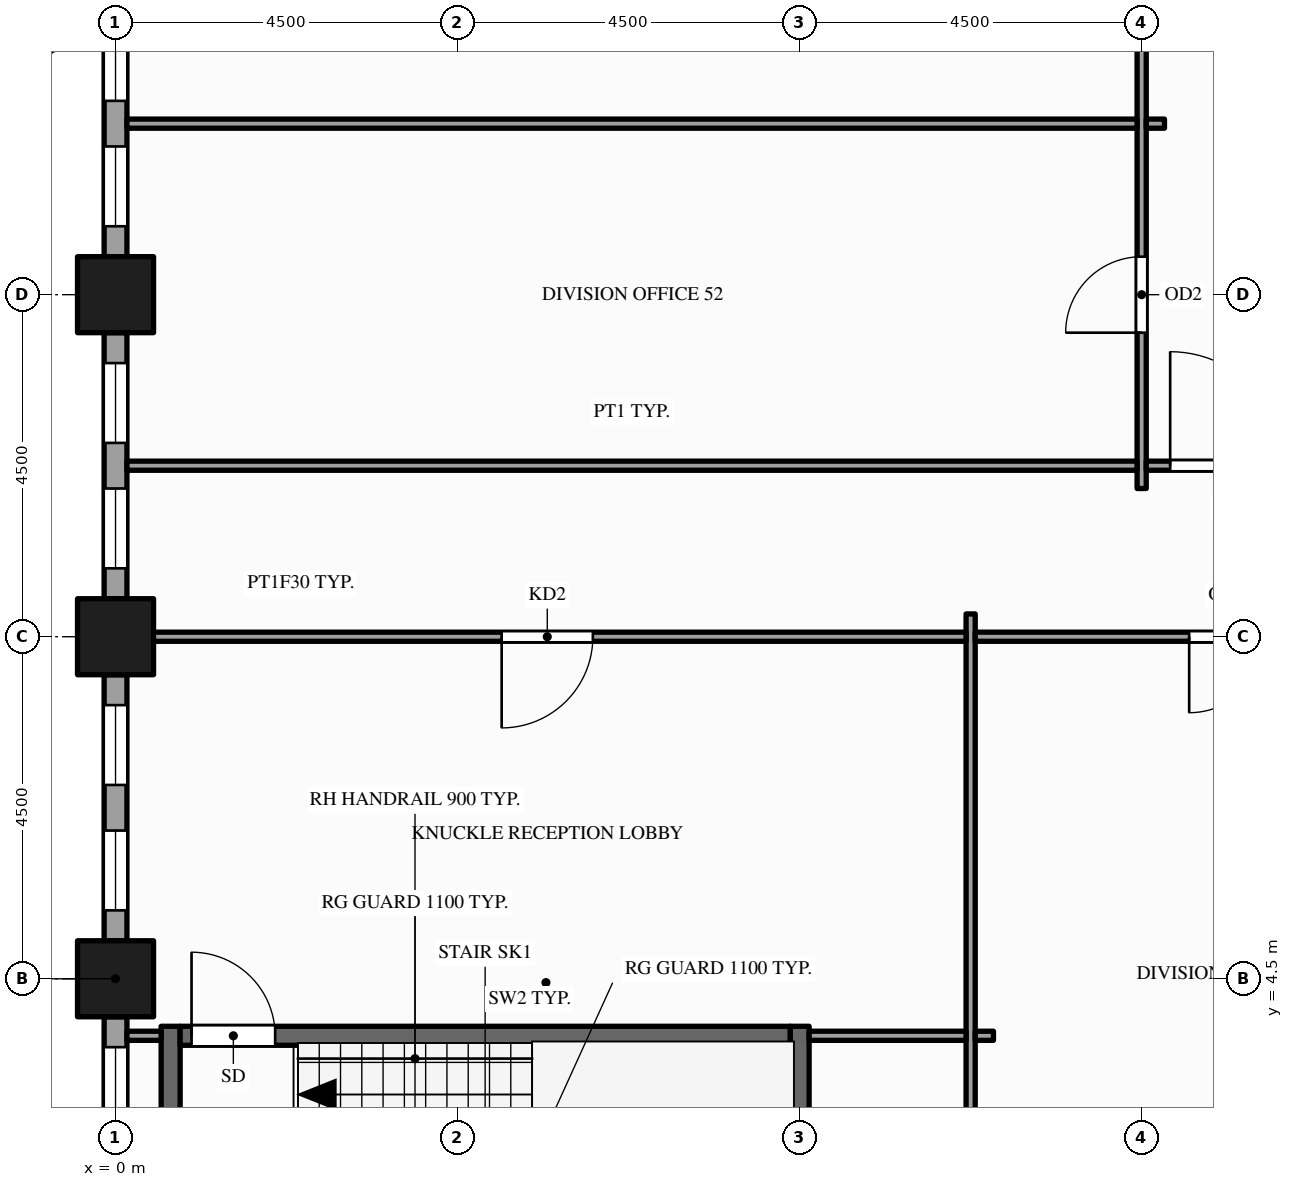
"""IFC4 building model, lengths in metres.
Left out: names, types, materials, properties, quantities, classifications, styles, units other than length and angle.
Written with IfcOpenShell. Run it as: python <this file> out.ifc"""

import sys

from ifc_helpers import new_model, si_unit, direction, frame, frame_2d, origin, origin_2d, place, context, subcontext, project, spatial, rectangle, hollow_rectangle, extrude, element, fill, save


model = new_model("IFC4")
c1 = context("Model", 3, precision=1e-05, world=origin(), true_north=direction((0.0, 1.0)))
c2 = subcontext(c1, "Body", "Model", "MODEL_VIEW")
j1 = project(units=[si_unit("LENGTHUNIT", "METRE"), si_unit("PLANEANGLEUNIT", "RADIAN")], contexts=[c1])
p1 = place(None, origin())
s1 = spatial("IfcSite", under=j1, at=p1, CompositionType="ELEMENT")
p2 = place(p1, origin())
s2 = spatial("IfcBuilding", under=s1, at=p2, CompositionType="ELEMENT")
p3 = place(p2, frame((0.0, 0.0, 95.0)))
s3 = spatial("IfcBuildingStorey", under=s2, at=p3, CompositionType="ELEMENT", Elevation=95.0)
for number, where, z_axis, x_axis in (
    (1, (0.0, 4.5, -0.15), (0.0, 0.0, 1.0), (1.0, 0.0, 0.0)),
    (2, (0.0, 9.0, -0.15), (0.0, 0.0, 1.0), (1.0, 0.0, 0.0)),
    (3, (0.0, 13.5, -0.15), (0.0, 0.0, 1.0), (1.0, 0.0, 0.0)),
):
    element("IfcColumn", number, at=place(p3, frame(where, z_axis=z_axis, x_axis=x_axis)), inside=s3, PredefinedType="COLUMN", context=c2, shape_type="SweptSolid", body=[
        extrude(hollow_rectangle(XDim=1.0, YDim=1.0, WallThickness=0.05, at=origin_2d()), origin(), (0.0, 0.0, 1.0), 4.0),
    ])
p4 = place(p3, frame((0.0, 17.5, 0.0), z_axis=(0.0, 0.0, 1.0), x_axis=(0.0, -1.0, 0.0)))
e4 = element("IfcWall", 4, at=p4, inside=s3, PredefinedType="STANDARD", context=c2, shape_type="SweptSolid", body=[
    extrude(rectangle(XDim=3.5, YDim=0.3, at=frame_2d((1.75, 0.0))), origin(), (0.0, 0.0, 1.0), 3.154),
])
p5 = place(p4, frame((0.4, 0.0, 0.9)))
e5 = element("IfcOpeningElement", 5, at=p5, cuts=e4, PredefinedType="OPENING", context=c2, shape_type="SweptSolid", body=[
    extrude(rectangle(XDim=1.05, YDim=2.0, at=frame_2d((0.525, 1.0))), frame((0.0, 0.16, 0.0), z_axis=(0.0, -1.0, 0.0), x_axis=(1.0, 0.0, 0.0)), (0.0, 0.0, 1.0), 0.32),
])
p6 = place(p4, frame((2.05, 0.0, 0.9)))
e6 = element("IfcOpeningElement", 6, at=p6, cuts=e4, PredefinedType="OPENING", context=c2, shape_type="SweptSolid", body=[
    extrude(rectangle(XDim=1.05, YDim=2.0, at=frame_2d((0.525, 1.0))), frame((0.0, 0.16, 0.0), z_axis=(0.0, -1.0, 0.0), x_axis=(1.0, 0.0, 0.0)), (0.0, 0.0, 1.0), 0.32),
])
p7 = place(p3, frame((0.0, 13.0, 0.0), z_axis=(0.0, 0.0, 1.0), x_axis=(0.0, -1.0, 0.0)))
e7 = element("IfcWall", 7, at=p7, inside=s3, PredefinedType="STANDARD", context=c2, shape_type="SweptSolid", body=[
    extrude(rectangle(XDim=3.5, YDim=0.3, at=frame_2d((1.75, 0.0))), origin(), (0.0, 0.0, 1.0), 3.154),
])
p8 = place(p7, frame((0.4, 0.0, 0.9)))
e8 = element("IfcOpeningElement", 8, at=p8, cuts=e7, PredefinedType="OPENING", context=c2, shape_type="SweptSolid", body=[
    extrude(rectangle(XDim=1.05, YDim=2.0, at=frame_2d((0.525, 1.0))), frame((0.0, 0.16, 0.0), z_axis=(0.0, -1.0, 0.0), x_axis=(1.0, 0.0, 0.0)), (0.0, 0.0, 1.0), 0.32),
])
p9 = place(p7, frame((2.05, 0.0, 0.9)))
e9 = element("IfcOpeningElement", 9, at=p9, cuts=e7, PredefinedType="OPENING", context=c2, shape_type="SweptSolid", body=[
    extrude(rectangle(XDim=1.05, YDim=2.0, at=frame_2d((0.525, 1.0))), frame((0.0, 0.16, 0.0), z_axis=(0.0, -1.0, 0.0), x_axis=(1.0, 0.0, 0.0)), (0.0, 0.0, 1.0), 0.32),
])
p10 = place(p3, frame((0.0, 8.5, 0.0), z_axis=(0.0, 0.0, 1.0), x_axis=(0.0, -1.0, 0.0)))
e10 = element("IfcWall", 10, at=p10, inside=s3, PredefinedType="STANDARD", context=c2, shape_type="SweptSolid", body=[
    extrude(rectangle(XDim=3.5, YDim=0.3, at=frame_2d((1.75, 0.0))), origin(), (0.0, 0.0, 1.0), 3.154),
])
p11 = place(p10, frame((0.4, 0.0, 0.9)))
e11 = element("IfcOpeningElement", 11, at=p11, cuts=e10, PredefinedType="OPENING", context=c2, shape_type="SweptSolid", body=[
    extrude(rectangle(XDim=1.05, YDim=2.0, at=frame_2d((0.525, 1.0))), frame((0.0, 0.16, 0.0), z_axis=(0.0, -1.0, 0.0), x_axis=(1.0, 0.0, 0.0)), (0.0, 0.0, 1.0), 0.32),
])
p12 = place(p10, frame((2.05, 0.0, 0.9)))
e12 = element("IfcOpeningElement", 12, at=p12, cuts=e10, PredefinedType="OPENING", context=c2, shape_type="SweptSolid", body=[
    extrude(rectangle(XDim=1.05, YDim=2.0, at=frame_2d((0.525, 1.0))), frame((0.0, 0.16, 0.0), z_axis=(0.0, -1.0, 0.0), x_axis=(1.0, 0.0, 0.0)), (0.0, 0.0, 1.0), 0.32),
])
p13 = place(p3, frame((0.0, 4.0, 0.0), z_axis=(0.0, 0.0, 1.0), x_axis=(0.0, -1.0, 0.0)))
e13 = element("IfcWall", 13, at=p13, inside=s3, PredefinedType="STANDARD", context=c2, shape_type="SweptSolid", body=[
    extrude(rectangle(XDim=3.5, YDim=0.3, at=frame_2d((1.75, 0.0))), origin(), (0.0, 0.0, 1.0), 3.154),
])
p14 = place(p13, frame((0.4, 0.0, 0.9)))
e14 = element("IfcOpeningElement", 14, at=p14, cuts=e13, PredefinedType="OPENING", context=c2, shape_type="SweptSolid", body=[
    extrude(rectangle(XDim=1.05, YDim=2.0, at=frame_2d((0.525, 1.0))), frame((0.0, 0.16, 0.0), z_axis=(0.0, -1.0, 0.0), x_axis=(1.0, 0.0, 0.0)), (0.0, 0.0, 1.0), 0.32),
])
p15 = place(p13, frame((2.05, 0.0, 0.9)))
e15 = element("IfcOpeningElement", 15, at=p15, cuts=e13, PredefinedType="OPENING", context=c2, shape_type="SweptSolid", body=[
    extrude(rectangle(XDim=1.05, YDim=2.0, at=frame_2d((0.525, 1.0))), frame((0.0, 0.16, 0.0), z_axis=(0.0, -1.0, 0.0), x_axis=(1.0, 0.0, 0.0)), (0.0, 0.0, 1.0), 0.32),
])
p16 = place(p3, frame((0.725, 0.6, 0.0), z_axis=(0.0, 0.0, 1.0), x_axis=(0.0, 1.0, 0.0)))
e16 = element("IfcWall", 16, at=p16, inside=s3, PredefinedType="SHEAR", context=c2, shape_type="SweptSolid", body=[
    extrude(rectangle(XDim=3.275, YDim=0.25, at=frame_2d((1.637, 0.0))), origin(), (0.0, 0.0, 1.0), 3.85),
])
p17 = place(p3, frame((9.0, 0.5, 0.0), z_axis=(0.0, 0.0, 1.0), x_axis=(0.0, 1.0, 0.0)))
e17 = element("IfcWall", 17, at=p17, inside=s3, PredefinedType="SHEAR", context=c2, shape_type="SweptSolid", body=[
    extrude(rectangle(XDim=3.375, YDim=0.25, at=frame_2d((1.688, 0.0))), origin(), (0.0, 0.0, 1.0), 3.85),
])
p18 = place(p3, frame((11.25, 0.15, 0.0), z_axis=(0.0, 0.0, 1.0), x_axis=(0.0, 1.0, 0.0)))
e18 = element("IfcWall", 18, at=p18, inside=s3, PredefinedType="PARTITIONING", context=c2, shape_type="SweptSolid", body=[
    extrude(rectangle(XDim=9.15, YDim=0.12, at=frame_2d((4.575, 0.0))), origin(), (0.0, 0.0, 1.0), 2.938),
])
p19 = place(p3, frame((13.5, 10.95, 0.0), z_axis=(0.0, 0.0, 1.0), x_axis=(0.0, 1.0, 0.0)))
e19 = element("IfcWall", 19, at=p19, inside=s3, PredefinedType="PARTITIONING", context=c2, shape_type="SweptSolid", body=[
    extrude(rectangle(XDim=20.85, YDim=0.12, at=frame_2d((10.425, 0.0))), origin(), (0.0, 0.0, 1.0), 2.6),
])
p20 = place(p19, frame((2.05, 0.0, 0.0)))
e20 = element("IfcOpeningElement", 20, at=p20, cuts=e19, PredefinedType="OPENING", context=c2, shape_type="SweptSolid", body=[
    extrude(rectangle(XDim=1.0, YDim=2.1, at=frame_2d((0.5, 1.05))), frame((0.0, 0.07, 0.0), z_axis=(0.0, -1.0, 0.0), x_axis=(1.0, 0.0, 0.0)), (0.0, 0.0, 1.0), 0.14),
])
p21 = place(p19, frame((6.55, 0.0, 0.0)))
e21 = element("IfcOpeningElement", 21, at=p21, cuts=e19, PredefinedType="OPENING", context=c2, shape_type="SweptSolid", body=[
    extrude(rectangle(XDim=1.0, YDim=2.1, at=frame_2d((0.5, 1.05))), frame((0.0, 0.07, 0.0), z_axis=(0.0, -1.0, 0.0), x_axis=(1.0, 0.0, 0.0)), (0.0, 0.0, 1.0), 0.14),
])
p22 = place(p19, frame((12.205, 0.0, 0.0)))
e22 = element("IfcOpeningElement", 22, at=p22, cuts=e19, PredefinedType="OPENING", context=c2, shape_type="SweptSolid", body=[
    extrude(rectangle(XDim=1.0, YDim=2.1, at=frame_2d((0.5, 1.05))), frame((0.0, 0.07, 0.0), z_axis=(0.0, -1.0, 0.0), x_axis=(1.0, 0.0, 0.0)), (0.0, 0.0, 1.0), 0.14),
])
p23 = place(p3, frame((0.15, 3.75, 0.0), z_axis=(0.0, 0.0, 1.0), x_axis=(1.0, 0.0, 0.0)))
e23 = element("IfcWall", 23, at=p23, inside=s3, PredefinedType="PARTITIONING", context=c2, shape_type="SweptSolid", body=[
    extrude(rectangle(XDim=0.45, YDim=0.12, at=frame_2d((0.225, 0.0))), origin(), (0.0, 0.0, 1.0), 3.154),
])
p24 = place(p3, frame((0.85, 3.75, 0.0), z_axis=(0.0, 0.0, 1.0), x_axis=(1.0, 0.0, 0.0)))
e24 = element("IfcWall", 24, at=p24, inside=s3, PredefinedType="SHEAR", context=c2, shape_type="SweptSolid", body=[
    extrude(rectangle(XDim=8.025, YDim=0.25, at=frame_2d((4.012, 0.0))), origin(), (0.0, 0.0, 1.0), 3.85),
])
p25 = place(p24, frame((0.15, 0.0, 0.0)))
e25 = element("IfcOpeningElement", 25, at=p25, cuts=e24, PredefinedType="OPENING", context=c2, shape_type="SweptSolid", body=[
    extrude(rectangle(XDim=1.1, YDim=2.1, at=frame_2d((0.55, 1.05))), frame((0.0, 0.135, 0.0), z_axis=(0.0, -1.0, 0.0), x_axis=(1.0, 0.0, 0.0)), (0.0, 0.0, 1.0), 0.27),
])
p26 = place(p3, frame((9.125, 3.75, 0.0), z_axis=(0.0, 0.0, 1.0), x_axis=(1.0, 0.0, 0.0)))
e26 = element("IfcWall", 26, at=p26, inside=s3, PredefinedType="PARTITIONING", context=c2, shape_type="SweptSolid", body=[
    extrude(rectangle(XDim=2.065, YDim=0.12, at=frame_2d((1.032, 0.0))), origin(), (0.0, 0.0, 1.0), 2.938),
])
p27 = place(p3, frame((11.31, 3.75, 0.0), z_axis=(0.0, 0.0, 1.0), x_axis=(1.0, 0.0, 0.0)))
e27 = element("IfcWall", 27, at=p27, inside=s3, PredefinedType="PARTITIONING", context=c2, shape_type="SweptSolid", body=[
    extrude(rectangle(XDim=0.24, YDim=0.12, at=frame_2d((0.12, 0.0))), origin(), (0.0, 0.0, 1.0), 2.938),
])
p28 = place(p3, frame((0.15, 9.0, 0.0), z_axis=(0.0, 0.0, 1.0), x_axis=(1.0, 0.0, 0.0)))
e28 = element("IfcWall", 28, at=p28, inside=s3, PredefinedType="PARTITIONING", context=c2, shape_type="SweptSolid", body=[
    extrude(rectangle(XDim=11.04, YDim=0.12, at=frame_2d((5.52, 0.0))), origin(), (0.0, 0.0, 1.0), 2.938),
])
p29 = place(p28, frame((4.93, 0.0, 0.0)))
e29 = element("IfcOpeningElement", 29, at=p29, cuts=e28, PredefinedType="OPENING", context=c2, shape_type="SweptSolid", body=[
    extrude(rectangle(XDim=1.2, YDim=2.1, at=frame_2d((0.6, 1.05))), frame((0.0, 0.07, 0.0), z_axis=(0.0, -1.0, 0.0), x_axis=(1.0, 0.0, 0.0)), (0.0, 0.0, 1.0), 0.14),
])
p30 = place(p3, frame((11.31, 9.0, 0.0), z_axis=(0.0, 0.0, 1.0), x_axis=(1.0, 0.0, 0.0)))
e30 = element("IfcWall", 30, at=p30, inside=s3, PredefinedType="PARTITIONING", context=c2, shape_type="SweptSolid", body=[
    extrude(rectangle(XDim=6.63, YDim=0.12, at=frame_2d((3.315, 0.0))), origin(), (0.0, 0.0, 1.0), 2.938),
])
p31 = place(p30, frame((2.815, 0.0, 0.0)))
e31 = element("IfcOpeningElement", 31, at=p31, cuts=e30, PredefinedType="OPENING", context=c2, shape_type="SweptSolid", body=[
    extrude(rectangle(XDim=1.0, YDim=2.1, at=frame_2d((0.5, 1.05))), frame((0.0, 0.07, 0.0), z_axis=(0.0, -1.0, 0.0), x_axis=(1.0, 0.0, 0.0)), (0.0, 0.0, 1.0), 0.14),
])
p32 = place(p3, frame((0.15, 11.25, 0.0), z_axis=(0.0, 0.0, 1.0), x_axis=(1.0, 0.0, 0.0)))
e32 = element("IfcWall", 32, at=p32, inside=s3, PredefinedType="PARTITIONING", context=c2, shape_type="SweptSolid", body=[
    extrude(rectangle(XDim=13.29, YDim=0.12, at=frame_2d((6.645, 0.0))), origin(), (0.0, 0.0, 1.0), 2.938),
])
p33 = place(p3, frame((13.56, 11.25, 0.0), z_axis=(0.0, 0.0, 1.0), x_axis=(1.0, 0.0, 0.0)))
e33 = element("IfcWall", 33, at=p33, inside=s3, PredefinedType="PARTITIONING", context=c2, shape_type="SweptSolid", body=[
    extrude(rectangle(XDim=2.13, YDim=0.12, at=frame_2d((1.065, 0.0))), origin(), (0.0, 0.0, 1.0), 2.938),
])
p34 = place(p33, frame((0.315, 0.0, 0.0)))
e34 = element("IfcOpeningElement", 34, at=p34, cuts=e33, PredefinedType="OPENING", context=c2, shape_type="SweptSolid", body=[
    extrude(rectangle(XDim=1.5, YDim=2.1, at=frame_2d((0.75, 1.05))), frame((0.0, 0.07, 0.0), z_axis=(0.0, -1.0, 0.0), x_axis=(1.0, 0.0, 0.0)), (0.0, 0.0, 1.0), 0.14),
])
p35 = place(p3, frame((0.15, 15.75, 0.0), z_axis=(0.0, 0.0, 1.0), x_axis=(1.0, 0.0, 0.0)))
e35 = element("IfcWall", 35, at=p35, inside=s3, PredefinedType="PARTITIONING", context=c2, shape_type="SweptSolid", body=[
    extrude(rectangle(XDim=13.29, YDim=0.12, at=frame_2d((6.645, 0.0))), origin(), (0.0, 0.0, 1.0), 2.938),
])
p36 = place(p3, frame((13.56, 15.75, 0.0), z_axis=(0.0, 0.0, 1.0), x_axis=(1.0, 0.0, 0.0)))
e36 = element("IfcWall", 36, at=p36, inside=s3, PredefinedType="PARTITIONING", context=c2, shape_type="SweptSolid", body=[
    extrude(rectangle(XDim=0.24, YDim=0.12, at=frame_2d((0.12, 0.0))), origin(), (0.0, 0.0, 1.0), 2.938),
])
p37 = place(p5, origin())
e37 = element("IfcWindow", 37, at=p37, inside=s3, PartitioningType="SINGLE_PANEL", PredefinedType="WINDOW", context=c2, shape_type="SweptSolid", body=[
    extrude(rectangle(XDim=1.05, YDim=2.0, at=frame_2d((0.525, 1.0))), frame((0.0, 0.03, 0.0), z_axis=(0.0, -1.0, 0.0), x_axis=(1.0, 0.0, 0.0)), (0.0, 0.0, 1.0), 0.06),
])
fill(e5, e37)
p38 = place(p6, origin())
e38 = element("IfcWindow", 38, at=p38, inside=s3, PartitioningType="SINGLE_PANEL", PredefinedType="WINDOW", context=c2, shape_type="SweptSolid", body=[
    extrude(rectangle(XDim=1.05, YDim=2.0, at=frame_2d((0.525, 1.0))), frame((0.0, 0.03, 0.0), z_axis=(0.0, -1.0, 0.0), x_axis=(1.0, 0.0, 0.0)), (0.0, 0.0, 1.0), 0.06),
])
fill(e6, e38)
p39 = place(p8, origin())
e39 = element("IfcWindow", 39, at=p39, inside=s3, PartitioningType="SINGLE_PANEL", PredefinedType="WINDOW", context=c2, shape_type="SweptSolid", body=[
    extrude(rectangle(XDim=1.05, YDim=2.0, at=frame_2d((0.525, 1.0))), frame((0.0, 0.03, 0.0), z_axis=(0.0, -1.0, 0.0), x_axis=(1.0, 0.0, 0.0)), (0.0, 0.0, 1.0), 0.06),
])
fill(e8, e39)
p40 = place(p9, origin())
e40 = element("IfcWindow", 40, at=p40, inside=s3, PartitioningType="SINGLE_PANEL", PredefinedType="WINDOW", context=c2, shape_type="SweptSolid", body=[
    extrude(rectangle(XDim=1.05, YDim=2.0, at=frame_2d((0.525, 1.0))), frame((0.0, 0.03, 0.0), z_axis=(0.0, -1.0, 0.0), x_axis=(1.0, 0.0, 0.0)), (0.0, 0.0, 1.0), 0.06),
])
fill(e9, e40)
p41 = place(p11, origin())
e41 = element("IfcWindow", 41, at=p41, inside=s3, PartitioningType="SINGLE_PANEL", PredefinedType="WINDOW", context=c2, shape_type="SweptSolid", body=[
    extrude(rectangle(XDim=1.05, YDim=2.0, at=frame_2d((0.525, 1.0))), frame((0.0, 0.03, 0.0), z_axis=(0.0, -1.0, 0.0), x_axis=(1.0, 0.0, 0.0)), (0.0, 0.0, 1.0), 0.06),
])
fill(e11, e41)
p42 = place(p12, origin())
e42 = element("IfcWindow", 42, at=p42, inside=s3, PartitioningType="SINGLE_PANEL", PredefinedType="WINDOW", context=c2, shape_type="SweptSolid", body=[
    extrude(rectangle(XDim=1.05, YDim=2.0, at=frame_2d((0.525, 1.0))), frame((0.0, 0.03, 0.0), z_axis=(0.0, -1.0, 0.0), x_axis=(1.0, 0.0, 0.0)), (0.0, 0.0, 1.0), 0.06),
])
fill(e12, e42)
p43 = place(p14, origin())
e43 = element("IfcWindow", 43, at=p43, inside=s3, PartitioningType="SINGLE_PANEL", PredefinedType="WINDOW", context=c2, shape_type="SweptSolid", body=[
    extrude(rectangle(XDim=1.05, YDim=2.0, at=frame_2d((0.525, 1.0))), frame((0.0, 0.03, 0.0), z_axis=(0.0, -1.0, 0.0), x_axis=(1.0, 0.0, 0.0)), (0.0, 0.0, 1.0), 0.06),
])
fill(e14, e43)
p44 = place(p25, origin())
e44 = element("IfcDoor", 44, at=p44, inside=s3, OperationType="SINGLE_SWING_LEFT", PredefinedType="DOOR", context=c2, shape_type="SweptSolid", body=[
    extrude(rectangle(XDim=1.1, YDim=2.1, at=frame_2d((0.55, 1.05))), frame((0.0, 0.025, 0.0), z_axis=(0.0, -1.0, 0.0), x_axis=(1.0, 0.0, 0.0)), (0.0, 0.0, 1.0), 0.05),
])
fill(e25, e44)
p45 = place(p29, origin())
e45 = element("IfcDoor", 45, at=p45, inside=s3, OperationType="SINGLE_SWING_LEFT", PredefinedType="DOOR", context=c2, shape_type="SweptSolid", body=[
    extrude(rectangle(XDim=1.2, YDim=2.1, at=frame_2d((0.6, 1.05))), frame((0.0, 0.025, 0.0), z_axis=(0.0, -1.0, 0.0), x_axis=(1.0, 0.0, 0.0)), (0.0, 0.0, 1.0), 0.05),
])
fill(e29, e45)
p46 = place(p31, origin())
e46 = element("IfcDoor", 46, at=p46, inside=s3, OperationType="SINGLE_SWING_LEFT", PredefinedType="DOOR", context=c2, shape_type="SweptSolid", body=[
    extrude(rectangle(XDim=1.0, YDim=2.1, at=frame_2d((0.5, 1.05))), frame((0.0, 0.025, 0.0), z_axis=(0.0, -1.0, 0.0), x_axis=(1.0, 0.0, 0.0)), (0.0, 0.0, 1.0), 0.05),
])
fill(e31, e46)
p47 = place(p34, origin())
e47 = element("IfcDoor", 47, at=p47, inside=s3, OperationType="SINGLE_SWING_LEFT", PredefinedType="DOOR", context=c2, shape_type="SweptSolid", body=[
    extrude(rectangle(XDim=1.5, YDim=2.1, at=frame_2d((0.75, 1.05))), frame((0.0, 0.025, 0.0), z_axis=(0.0, -1.0, 0.0), x_axis=(1.0, 0.0, 0.0)), (0.0, 0.0, 1.0), 0.05),
])
fill(e34, e47)
p48 = place(p20, origin())
e48 = element("IfcDoor", 48, at=p48, inside=s3, OperationType="SINGLE_SWING_LEFT", PredefinedType="DOOR", context=c2, shape_type="SweptSolid", body=[
    extrude(rectangle(XDim=1.0, YDim=2.1, at=frame_2d((0.5, 1.05))), frame((0.0, 0.025, 0.0), z_axis=(0.0, -1.0, 0.0), x_axis=(1.0, 0.0, 0.0)), (0.0, 0.0, 1.0), 0.05),
])
fill(e20, e48)
save(model, sys.argv[1])
